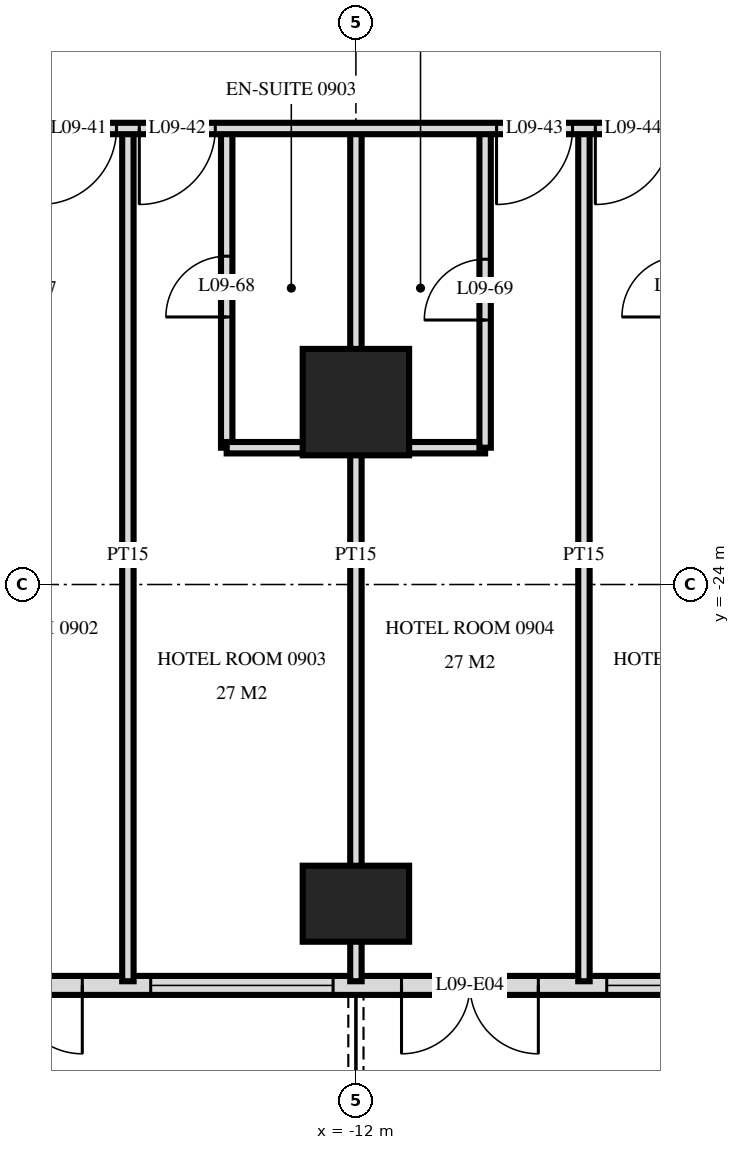
"""IFC4 building model, lengths in metres.
Left out: names, types, materials, properties, quantities, classifications, styles, units other than length and angle.
Written with IfcOpenShell. Run it as: python <this file> out.ifc"""

import sys

from ifc_helpers import new_model, si_unit, direction, frame, frame_2d, origin, origin_2d, place, context, subcontext, project, spatial, rectangle, extrude, element, fill, save


model = new_model("IFC4")
c1 = context("Model", 3, precision=1e-05, world=origin(), true_north=direction((0.0, 1.0)))
c2 = subcontext(c1, "Body", "Model", "MODEL_VIEW")
j1 = project(units=[si_unit("LENGTHUNIT", "METRE"), si_unit("PLANEANGLEUNIT", "RADIAN")], contexts=[c1])
p1 = place(None, origin())
s1 = spatial("IfcSite", under=j1, at=p1, CompositionType="ELEMENT")
p2 = place(p1, origin())
s2 = spatial("IfcBuilding", under=s1, at=p2, CompositionType="ELEMENT")
p3 = place(p2, frame((0.0, 0.0, 42.0)))
s3 = spatial("IfcBuildingStorey", under=s2, at=p3, CompositionType="ELEMENT", Elevation=42.0)
p4 = place(p3, frame((-12.0, -28.2, 0.0), z_axis=(0.0, 0.0, 1.0), x_axis=(1.0, 0.0, 0.0)))
e1 = element("IfcColumn", 1, at=p4, inside=s3, PredefinedType="COLUMN", context=c2, shape_type="SweptSolid", body=[
    extrude(rectangle(XDim=1.4, YDim=1.0, at=origin_2d()), origin(), (0.0, 0.0, 1.0), 3.6),
])
p5 = place(p3, frame((-12.0, -21.6, 0.0), z_axis=(0.0, 0.0, 1.0), x_axis=(1.0, 0.0, 0.0)))
e2 = element("IfcColumn", 2, at=p5, inside=s3, PredefinedType="COLUMN", context=c2, shape_type="SweptSolid", body=[
    extrude(rectangle(XDim=1.4, YDim=1.4, at=origin_2d()), origin(), (0.0, 0.0, 1.0), 3.6),
])
p6 = place(p3, frame((-28.775, -29.275, 0.0), z_axis=(0.0, 0.0, 1.0), x_axis=(1.0, 0.0, 0.0)))
e3 = element("IfcWall", 3, at=p6, inside=s3, PredefinedType="SOLIDWALL", context=c2, shape_type="SweptSolid", body=[
    extrude(rectangle(XDim=57.551, YDim=0.25, at=frame_2d((28.775, 0.0))), origin(), (0.0, 0.0, 1.0), 3.32),
])
p7 = place(p6, frame((0.575, 0.0, 0.0)))
e4 = element("IfcOpeningElement", 4, at=p7, cuts=e3, PredefinedType="OPENING", context=c2, shape_type="SweptSolid", body=[
    extrude(rectangle(XDim=1.8, YDim=2.4, at=frame_2d((0.9, 1.2))), frame((0.0, 0.135, 0.0), z_axis=(0.0, -1.0, 0.0), x_axis=(1.0, 0.0, 0.0)), (0.0, 0.0, 1.0), 0.27),
])
p8 = place(p6, frame((5.375, 0.0, 0.0)))
e5 = element("IfcOpeningElement", 5, at=p8, cuts=e3, PredefinedType="OPENING", context=c2, shape_type="SweptSolid", body=[
    extrude(rectangle(XDim=1.8, YDim=2.4, at=frame_2d((0.9, 1.2))), frame((0.0, 0.135, 0.0), z_axis=(0.0, -1.0, 0.0), x_axis=(1.0, 0.0, 0.0)), (0.0, 0.0, 1.0), 0.27),
])
p9 = place(p6, frame((8.075, 0.0, 0.3)))
e6 = element("IfcOpeningElement", 6, at=p9, cuts=e3, PredefinedType="OPENING", context=c2, shape_type="SweptSolid", body=[
    extrude(rectangle(XDim=2.4, YDim=2.1, at=frame_2d((1.2, 1.05))), frame((0.0, 0.135, 0.0), z_axis=(0.0, -1.0, 0.0), x_axis=(1.0, 0.0, 0.0)), (0.0, 0.0, 1.0), 0.27),
])
p10 = place(p6, frame((11.375, 0.0, 0.0)))
e7 = element("IfcOpeningElement", 7, at=p10, cuts=e3, PredefinedType="OPENING", context=c2, shape_type="SweptSolid", body=[
    extrude(rectangle(XDim=1.8, YDim=2.4, at=frame_2d((0.9, 1.2))), frame((0.0, 0.135, 0.0), z_axis=(0.0, -1.0, 0.0), x_axis=(1.0, 0.0, 0.0)), (0.0, 0.0, 1.0), 0.27),
])
p11 = place(p6, frame((14.075, 0.0, 0.3)))
e8 = element("IfcOpeningElement", 8, at=p11, cuts=e3, PredefinedType="OPENING", context=c2, shape_type="SweptSolid", body=[
    extrude(rectangle(XDim=2.4, YDim=2.1, at=frame_2d((1.2, 1.05))), frame((0.0, 0.135, 0.0), z_axis=(0.0, -1.0, 0.0), x_axis=(1.0, 0.0, 0.0)), (0.0, 0.0, 1.0), 0.27),
])
p12 = place(p6, frame((17.375, 0.0, 0.0)))
e9 = element("IfcOpeningElement", 9, at=p12, cuts=e3, PredefinedType="OPENING", context=c2, shape_type="SweptSolid", body=[
    extrude(rectangle(XDim=1.8, YDim=2.4, at=frame_2d((0.9, 1.2))), frame((0.0, 0.135, 0.0), z_axis=(0.0, -1.0, 0.0), x_axis=(1.0, 0.0, 0.0)), (0.0, 0.0, 1.0), 0.27),
])
p13 = place(p6, frame((20.075, 0.0, 0.3)))
e10 = element("IfcOpeningElement", 10, at=p13, cuts=e3, PredefinedType="OPENING", context=c2, shape_type="SweptSolid", body=[
    extrude(rectangle(XDim=2.4, YDim=2.1, at=frame_2d((1.2, 1.05))), frame((0.0, 0.135, 0.0), z_axis=(0.0, -1.0, 0.0), x_axis=(1.0, 0.0, 0.0)), (0.0, 0.0, 1.0), 0.27),
])
p14 = place(p6, frame((23.075, 0.0, 0.3)))
e11 = element("IfcOpeningElement", 11, at=p14, cuts=e3, PredefinedType="OPENING", context=c2, shape_type="SweptSolid", body=[
    extrude(rectangle(XDim=2.4, YDim=2.1, at=frame_2d((1.2, 1.05))), frame((0.0, 0.135, 0.0), z_axis=(0.0, -1.0, 0.0), x_axis=(1.0, 0.0, 0.0)), (0.0, 0.0, 1.0), 0.27),
])
p15 = place(p6, frame((26.375, 0.0, 0.0)))
e12 = element("IfcOpeningElement", 12, at=p15, cuts=e3, PredefinedType="OPENING", context=c2, shape_type="SweptSolid", body=[
    extrude(rectangle(XDim=1.8, YDim=2.4, at=frame_2d((0.9, 1.2))), frame((0.0, 0.135, 0.0), z_axis=(0.0, -1.0, 0.0), x_axis=(1.0, 0.0, 0.0)), (0.0, 0.0, 1.0), 0.27),
])
p16 = place(p6, frame((29.375, 0.0, 0.0)))
e13 = element("IfcOpeningElement", 13, at=p16, cuts=e3, PredefinedType="OPENING", context=c2, shape_type="SweptSolid", body=[
    extrude(rectangle(XDim=1.8, YDim=2.4, at=frame_2d((0.9, 1.2))), frame((0.0, 0.135, 0.0), z_axis=(0.0, -1.0, 0.0), x_axis=(1.0, 0.0, 0.0)), (0.0, 0.0, 1.0), 0.27),
])
p17 = place(p6, frame((32.075, 0.0, 0.3)))
e14 = element("IfcOpeningElement", 14, at=p17, cuts=e3, PredefinedType="OPENING", context=c2, shape_type="SweptSolid", body=[
    extrude(rectangle(XDim=2.4, YDim=2.1, at=frame_2d((1.2, 1.05))), frame((0.0, 0.135, 0.0), z_axis=(0.0, -1.0, 0.0), x_axis=(1.0, 0.0, 0.0)), (0.0, 0.0, 1.0), 0.27),
])
p18 = place(p6, frame((35.375, 0.0, 0.0)))
e15 = element("IfcOpeningElement", 15, at=p18, cuts=e3, PredefinedType="OPENING", context=c2, shape_type="SweptSolid", body=[
    extrude(rectangle(XDim=1.8, YDim=2.4, at=frame_2d((0.9, 1.2))), frame((0.0, 0.135, 0.0), z_axis=(0.0, -1.0, 0.0), x_axis=(1.0, 0.0, 0.0)), (0.0, 0.0, 1.0), 0.27),
])
p19 = place(p6, frame((38.075, 0.0, 0.3)))
e16 = element("IfcOpeningElement", 16, at=p19, cuts=e3, PredefinedType="OPENING", context=c2, shape_type="SweptSolid", body=[
    extrude(rectangle(XDim=2.4, YDim=2.1, at=frame_2d((1.2, 1.05))), frame((0.0, 0.135, 0.0), z_axis=(0.0, -1.0, 0.0), x_axis=(1.0, 0.0, 0.0)), (0.0, 0.0, 1.0), 0.27),
])
p20 = place(p6, frame((41.375, 0.0, 0.0)))
e17 = element("IfcOpeningElement", 17, at=p20, cuts=e3, PredefinedType="OPENING", context=c2, shape_type="SweptSolid", body=[
    extrude(rectangle(XDim=1.8, YDim=2.4, at=frame_2d((0.9, 1.2))), frame((0.0, 0.135, 0.0), z_axis=(0.0, -1.0, 0.0), x_axis=(1.0, 0.0, 0.0)), (0.0, 0.0, 1.0), 0.27),
])
p21 = place(p6, frame((44.075, 0.0, 0.3)))
e18 = element("IfcOpeningElement", 18, at=p21, cuts=e3, PredefinedType="OPENING", context=c2, shape_type="SweptSolid", body=[
    extrude(rectangle(XDim=2.4, YDim=2.1, at=frame_2d((1.2, 1.05))), frame((0.0, 0.135, 0.0), z_axis=(0.0, -1.0, 0.0), x_axis=(1.0, 0.0, 0.0)), (0.0, 0.0, 1.0), 0.27),
])
p22 = place(p6, frame((47.375, 0.0, 0.0)))
e19 = element("IfcOpeningElement", 19, at=p22, cuts=e3, PredefinedType="OPENING", context=c2, shape_type="SweptSolid", body=[
    extrude(rectangle(XDim=1.8, YDim=2.4, at=frame_2d((0.9, 1.2))), frame((0.0, 0.135, 0.0), z_axis=(0.0, -1.0, 0.0), x_axis=(1.0, 0.0, 0.0)), (0.0, 0.0, 1.0), 0.27),
])
p23 = place(p6, frame((50.075, 0.0, 0.3)))
e20 = element("IfcOpeningElement", 20, at=p23, cuts=e3, PredefinedType="OPENING", context=c2, shape_type="SweptSolid", body=[
    extrude(rectangle(XDim=2.4, YDim=2.1, at=frame_2d((1.2, 1.05))), frame((0.0, 0.135, 0.0), z_axis=(0.0, -1.0, 0.0), x_axis=(1.0, 0.0, 0.0)), (0.0, 0.0, 1.0), 0.27),
])
p24 = place(p6, frame((53.375, 0.0, 0.0)))
e21 = element("IfcOpeningElement", 21, at=p24, cuts=e3, PredefinedType="OPENING", context=c2, shape_type="SweptSolid", body=[
    extrude(rectangle(XDim=1.8, YDim=2.4, at=frame_2d((0.9, 1.2))), frame((0.0, 0.135, 0.0), z_axis=(0.0, -1.0, 0.0), x_axis=(1.0, 0.0, 0.0)), (0.0, 0.0, 1.0), 0.27),
])
p25 = place(p3, frame((-9.0, -29.22, 0.0), z_axis=(0.0, 0.0, 1.0), x_axis=(0.0, 1.0, 0.0)))
e22 = element("IfcWall", 22, at=p25, inside=s3, PredefinedType="PARTITIONING", context=c2, shape_type="SweptSolid", body=[
    extrude(rectangle(XDim=11.22, YDim=0.15, at=frame_2d((5.61, 0.0))), origin(), (0.0, 0.0, 1.0), 3.32),
])
p26 = place(p3, frame((-10.3, -22.2, 0.0), z_axis=(0.0, 0.0, 1.0), x_axis=(0.0, 1.0, 0.0)))
e23 = element("IfcWall", 23, at=p26, inside=s3, PredefinedType="PARTITIONING", context=c2, shape_type="SweptSolid", body=[
    extrude(rectangle(XDim=4.2, YDim=0.15, at=frame_2d((2.1, 0.0))), origin(), (0.0, 0.0, 1.0), 3.32),
])
p27 = place(p26, frame((1.68, 0.0, 0.0)))
e24 = element("IfcOpeningElement", 24, at=p27, cuts=e23, PredefinedType="OPENING", context=c2, shape_type="SweptSolid", body=[
    extrude(rectangle(XDim=0.8, YDim=2.1, at=frame_2d((0.4, 1.05))), frame((0.0, 0.085, 0.0), z_axis=(0.0, -1.0, 0.0), x_axis=(1.0, 0.0, 0.0)), (0.0, 0.0, 1.0), 0.17),
])
p28 = place(p3, frame((-12.0, -29.22, 0.0), z_axis=(0.0, 0.0, 1.0), x_axis=(0.0, 1.0, 0.0)))
e25 = element("IfcWall", 25, at=p28, inside=s3, PredefinedType="PARTITIONING", context=c2, shape_type="SweptSolid", body=[
    extrude(rectangle(XDim=11.22, YDim=0.15, at=frame_2d((5.61, 0.0))), origin(), (0.0, 0.0, 1.0), 3.32),
])
p29 = place(p3, frame((-13.7, -22.2, 0.0), z_axis=(0.0, 0.0, 1.0), x_axis=(0.0, 1.0, 0.0)))
e26 = element("IfcWall", 26, at=p29, inside=s3, PredefinedType="PARTITIONING", context=c2, shape_type="SweptSolid", body=[
    extrude(rectangle(XDim=4.2, YDim=0.15, at=frame_2d((2.1, 0.0))), origin(), (0.0, 0.0, 1.0), 3.32),
])
p30 = place(p29, frame((1.72, 0.0, 0.0)))
e27 = element("IfcOpeningElement", 27, at=p30, cuts=e26, PredefinedType="OPENING", context=c2, shape_type="SweptSolid", body=[
    extrude(rectangle(XDim=0.8, YDim=2.1, at=frame_2d((0.4, 1.05))), frame((0.0, 0.085, 0.0), z_axis=(0.0, -1.0, 0.0), x_axis=(1.0, 0.0, 0.0)), (0.0, 0.0, 1.0), 0.17),
])
p31 = place(p3, frame((-15.0, -29.22, 0.0), z_axis=(0.0, 0.0, 1.0), x_axis=(0.0, 1.0, 0.0)))
e28 = element("IfcWall", 28, at=p31, inside=s3, PredefinedType="PARTITIONING", context=c2, shape_type="SweptSolid", body=[
    extrude(rectangle(XDim=11.22, YDim=0.15, at=frame_2d((5.61, 0.0))), origin(), (0.0, 0.0, 1.0), 3.32),
])
p32 = place(p3, frame((-13.7, -22.2, 0.0), z_axis=(0.0, 0.0, 1.0), x_axis=(1.0, 0.0, 0.0)))
e29 = element("IfcWall", 29, at=p32, inside=s3, PredefinedType="PARTITIONING", context=c2, shape_type="SweptSolid", body=[
    extrude(rectangle(XDim=3.4, YDim=0.15, at=frame_2d((1.7, 0.0))), origin(), (0.0, 0.0, 1.0), 3.32),
])
p33 = place(p3, frame((-33.12, -18.0, 0.0), z_axis=(0.0, 0.0, 1.0), x_axis=(1.0, 0.0, 0.0)))
e30 = element("IfcWall", 30, at=p33, inside=s3, PredefinedType="PARTITIONING", context=c2, shape_type="SweptSolid", body=[
    extrude(rectangle(XDim=66.24, YDim=0.15, at=frame_2d((33.12, 0.0))), origin(), (0.0, 0.0, 1.0), 3.32),
])
p34 = place(p33, frame((12.27, 0.0, 0.0)))
e31 = element("IfcOpeningElement", 31, at=p34, cuts=e30, PredefinedType="OPENING", context=c2, shape_type="SweptSolid", body=[
    extrude(rectangle(XDim=1.0, YDim=2.1, at=frame_2d((0.5, 1.05))), frame((0.0, 0.085, 0.0), z_axis=(0.0, -1.0, 0.0), x_axis=(1.0, 0.0, 0.0)), (0.0, 0.0, 1.0), 0.17),
])
p35 = place(p33, frame((16.97, 0.0, 0.0)))
e32 = element("IfcOpeningElement", 32, at=p35, cuts=e30, PredefinedType="OPENING", context=c2, shape_type="SweptSolid", body=[
    extrude(rectangle(XDim=1.0, YDim=2.1, at=frame_2d((0.5, 1.05))), frame((0.0, 0.085, 0.0), z_axis=(0.0, -1.0, 0.0), x_axis=(1.0, 0.0, 0.0)), (0.0, 0.0, 1.0), 0.17),
])
p36 = place(p33, frame((18.27, 0.0, 0.0)))
e33 = element("IfcOpeningElement", 33, at=p36, cuts=e30, PredefinedType="OPENING", context=c2, shape_type="SweptSolid", body=[
    extrude(rectangle(XDim=1.0, YDim=2.1, at=frame_2d((0.5, 1.05))), frame((0.0, 0.085, 0.0), z_axis=(0.0, -1.0, 0.0), x_axis=(1.0, 0.0, 0.0)), (0.0, 0.0, 1.0), 0.17),
])
p37 = place(p33, frame((22.97, 0.0, 0.0)))
e34 = element("IfcOpeningElement", 34, at=p37, cuts=e30, PredefinedType="OPENING", context=c2, shape_type="SweptSolid", body=[
    extrude(rectangle(XDim=1.0, YDim=2.1, at=frame_2d((0.5, 1.05))), frame((0.0, 0.085, 0.0), z_axis=(0.0, -1.0, 0.0), x_axis=(1.0, 0.0, 0.0)), (0.0, 0.0, 1.0), 0.17),
])
p38 = place(p33, frame((24.27, 0.0, 0.0)))
e35 = element("IfcOpeningElement", 35, at=p38, cuts=e30, PredefinedType="OPENING", context=c2, shape_type="SweptSolid", body=[
    extrude(rectangle(XDim=1.0, YDim=2.1, at=frame_2d((0.5, 1.05))), frame((0.0, 0.085, 0.0), z_axis=(0.0, -1.0, 0.0), x_axis=(1.0, 0.0, 0.0)), (0.0, 0.0, 1.0), 0.17),
])
p39 = place(p33, frame((28.97, 0.0, 0.0)))
e36 = element("IfcOpeningElement", 36, at=p39, cuts=e30, PredefinedType="OPENING", context=c2, shape_type="SweptSolid", body=[
    extrude(rectangle(XDim=1.0, YDim=2.1, at=frame_2d((0.5, 1.05))), frame((0.0, 0.085, 0.0), z_axis=(0.0, -1.0, 0.0), x_axis=(1.0, 0.0, 0.0)), (0.0, 0.0, 1.0), 0.17),
])
p40 = place(p33, frame((30.27, 0.0, 0.0)))
e37 = element("IfcOpeningElement", 37, at=p40, cuts=e30, PredefinedType="OPENING", context=c2, shape_type="SweptSolid", body=[
    extrude(rectangle(XDim=1.0, YDim=2.1, at=frame_2d((0.5, 1.05))), frame((0.0, 0.085, 0.0), z_axis=(0.0, -1.0, 0.0), x_axis=(1.0, 0.0, 0.0)), (0.0, 0.0, 1.0), 0.17),
])
p41 = place(p33, frame((34.97, 0.0, 0.0)))
e38 = element("IfcOpeningElement", 38, at=p41, cuts=e30, PredefinedType="OPENING", context=c2, shape_type="SweptSolid", body=[
    extrude(rectangle(XDim=1.0, YDim=2.1, at=frame_2d((0.5, 1.05))), frame((0.0, 0.085, 0.0), z_axis=(0.0, -1.0, 0.0), x_axis=(1.0, 0.0, 0.0)), (0.0, 0.0, 1.0), 0.17),
])
p42 = place(p33, frame((37.27, 0.0, 0.0)))
e39 = element("IfcOpeningElement", 39, at=p42, cuts=e30, PredefinedType="OPENING", context=c2, shape_type="SweptSolid", body=[
    extrude(rectangle(XDim=1.0, YDim=2.1, at=frame_2d((0.5, 1.05))), frame((0.0, 0.085, 0.0), z_axis=(0.0, -1.0, 0.0), x_axis=(1.0, 0.0, 0.0)), (0.0, 0.0, 1.0), 0.17),
])
p43 = place(p33, frame((43.97, 0.0, 0.0)))
e40 = element("IfcOpeningElement", 40, at=p43, cuts=e30, PredefinedType="OPENING", context=c2, shape_type="SweptSolid", body=[
    extrude(rectangle(XDim=1.0, YDim=2.1, at=frame_2d((0.5, 1.05))), frame((0.0, 0.085, 0.0), z_axis=(0.0, -1.0, 0.0), x_axis=(1.0, 0.0, 0.0)), (0.0, 0.0, 1.0), 0.17),
])
p44 = place(p33, frame((45.27, 0.0, 0.0)))
e41 = element("IfcOpeningElement", 41, at=p44, cuts=e30, PredefinedType="OPENING", context=c2, shape_type="SweptSolid", body=[
    extrude(rectangle(XDim=1.0, YDim=2.1, at=frame_2d((0.5, 1.05))), frame((0.0, 0.085, 0.0), z_axis=(0.0, -1.0, 0.0), x_axis=(1.0, 0.0, 0.0)), (0.0, 0.0, 1.0), 0.17),
])
p45 = place(p33, frame((51.22, 0.0, 0.0)))
e42 = element("IfcOpeningElement", 42, at=p45, cuts=e30, PredefinedType="OPENING", context=c2, shape_type="SweptSolid", body=[
    extrude(rectangle(XDim=1.0, YDim=2.1, at=frame_2d((0.5, 1.05))), frame((0.0, 0.085, 0.0), z_axis=(0.0, -1.0, 0.0), x_axis=(1.0, 0.0, 0.0)), (0.0, 0.0, 1.0), 0.17),
])
p46 = place(p33, frame((54.27, 0.0, 0.0)))
e43 = element("IfcOpeningElement", 43, at=p46, cuts=e30, PredefinedType="OPENING", context=c2, shape_type="SweptSolid", body=[
    extrude(rectangle(XDim=1.0, YDim=2.1, at=frame_2d((0.5, 1.05))), frame((0.0, 0.085, 0.0), z_axis=(0.0, -1.0, 0.0), x_axis=(1.0, 0.0, 0.0)), (0.0, 0.0, 1.0), 0.17),
])
p47 = place(p33, frame((6.07, 0.0, 0.0)))
e44 = element("IfcOpeningElement", 44, at=p47, cuts=e30, PredefinedType="OPENING", context=c2, shape_type="SweptSolid", body=[
    extrude(rectangle(XDim=1.0, YDim=2.1, at=frame_2d((0.5, 1.05))), frame((0.0, 0.085, 0.0), z_axis=(0.0, -1.0, 0.0), x_axis=(1.0, 0.0, 0.0)), (0.0, 0.0, 1.0), 0.17),
])
p48 = place(p33, frame((63.37, 0.0, 0.0)))
e45 = element("IfcOpeningElement", 45, at=p48, cuts=e30, PredefinedType="OPENING", context=c2, shape_type="SweptSolid", body=[
    extrude(rectangle(XDim=1.0, YDim=2.1, at=frame_2d((0.5, 1.05))), frame((0.0, 0.085, 0.0), z_axis=(0.0, -1.0, 0.0), x_axis=(1.0, 0.0, 0.0)), (0.0, 0.0, 1.0), 0.17),
])
p49 = place(p10, frame((0.9, 0.0, 0.0), z_axis=(0.0, 0.0, 1.0), x_axis=(-1.0, 0.0, 0.0)))
e46 = element("IfcDoor", 46, at=p49, inside=s3, OperationType="DOUBLE_DOOR_SINGLE_SWING", PredefinedType="DOOR", context=c2, shape_type="SweptSolid", body=[
    extrude(rectangle(XDim=1.8, YDim=2.4, at=frame_2d((0.0, 1.2))), frame((0.0, -0.025, 0.0), z_axis=(0.0, 1.0, 0.0), x_axis=(-1.0, 0.0, 0.0)), (0.0, 0.0, 1.0), 0.05),
])
fill(e7, e46)
p50 = place(p11, origin())
e47 = element("IfcWindow", 47, at=p50, inside=s3, PartitioningType="SINGLE_PANEL", PredefinedType="WINDOW", context=c2, shape_type="SweptSolid", body=[
    extrude(rectangle(XDim=2.4, YDim=2.1, at=frame_2d((1.2, 1.05))), frame((0.0, 0.03, 0.0), z_axis=(0.0, -1.0, 0.0), x_axis=(1.0, 0.0, 0.0)), (0.0, 0.0, 1.0), 0.06),
])
fill(e8, e47)
p51 = place(p12, frame((0.9, 0.0, 0.0), z_axis=(0.0, 0.0, 1.0), x_axis=(-1.0, 0.0, 0.0)))
e48 = element("IfcDoor", 48, at=p51, inside=s3, OperationType="DOUBLE_DOOR_SINGLE_SWING", PredefinedType="DOOR", context=c2, shape_type="SweptSolid", body=[
    extrude(rectangle(XDim=1.8, YDim=2.4, at=frame_2d((0.0, 1.2))), frame((0.0, -0.025, 0.0), z_axis=(0.0, 1.0, 0.0), x_axis=(-1.0, 0.0, 0.0)), (0.0, 0.0, 1.0), 0.05),
])
fill(e9, e48)
p52 = place(p13, origin())
e49 = element("IfcWindow", 49, at=p52, inside=s3, PartitioningType="SINGLE_PANEL", PredefinedType="WINDOW", context=c2, shape_type="SweptSolid", body=[
    extrude(rectangle(XDim=2.4, YDim=2.1, at=frame_2d((1.2, 1.05))), frame((0.0, 0.03, 0.0), z_axis=(0.0, -1.0, 0.0), x_axis=(1.0, 0.0, 0.0)), (0.0, 0.0, 1.0), 0.06),
])
fill(e10, e49)
p53 = place(p35, frame((0.5, 0.0, 0.0), z_axis=(0.0, 0.0, 1.0), x_axis=(-1.0, 0.0, 0.0)))
e50 = element("IfcDoor", 50, at=p53, inside=s3, OperationType="SINGLE_SWING_LEFT", PredefinedType="DOOR", context=c2, shape_type="SweptSolid", body=[
    extrude(rectangle(XDim=1.0, YDim=2.1, at=frame_2d((0.0, 1.05))), frame((0.0, -0.025, 0.0), z_axis=(0.0, 1.0, 0.0), x_axis=(-1.0, 0.0, 0.0)), (0.0, 0.0, 1.0), 0.05),
])
fill(e32, e50)
p54 = place(p36, frame((0.5, 0.0, 0.0), z_axis=(0.0, 0.0, 1.0), x_axis=(-1.0, 0.0, 0.0)))
e51 = element("IfcDoor", 51, at=p54, inside=s3, OperationType="SINGLE_SWING_LEFT", PredefinedType="DOOR", context=c2, shape_type="SweptSolid", body=[
    extrude(rectangle(XDim=1.0, YDim=2.1, at=frame_2d((0.0, 1.05))), frame((0.0, -0.025, 0.0), z_axis=(0.0, 1.0, 0.0), x_axis=(-1.0, 0.0, 0.0)), (0.0, 0.0, 1.0), 0.05),
])
fill(e33, e51)
p55 = place(p37, frame((0.5, 0.0, 0.0), z_axis=(0.0, 0.0, 1.0), x_axis=(-1.0, 0.0, 0.0)))
e52 = element("IfcDoor", 52, at=p55, inside=s3, OperationType="SINGLE_SWING_LEFT", PredefinedType="DOOR", context=c2, shape_type="SweptSolid", body=[
    extrude(rectangle(XDim=1.0, YDim=2.1, at=frame_2d((0.0, 1.05))), frame((0.0, -0.025, 0.0), z_axis=(0.0, 1.0, 0.0), x_axis=(-1.0, 0.0, 0.0)), (0.0, 0.0, 1.0), 0.05),
])
fill(e34, e52)
p56 = place(p38, frame((0.5, 0.0, 0.0), z_axis=(0.0, 0.0, 1.0), x_axis=(-1.0, 0.0, 0.0)))
e53 = element("IfcDoor", 53, at=p56, inside=s3, OperationType="SINGLE_SWING_LEFT", PredefinedType="DOOR", context=c2, shape_type="SweptSolid", body=[
    extrude(rectangle(XDim=1.0, YDim=2.1, at=frame_2d((0.0, 1.05))), frame((0.0, -0.025, 0.0), z_axis=(0.0, 1.0, 0.0), x_axis=(-1.0, 0.0, 0.0)), (0.0, 0.0, 1.0), 0.05),
])
fill(e35, e53)
p57 = place(p30, origin())
e54 = element("IfcDoor", 54, at=p57, inside=s3, OperationType="SINGLE_SWING_RIGHT", PredefinedType="DOOR", context=c2, shape_type="SweptSolid", body=[
    extrude(rectangle(XDim=0.8, YDim=2.1, at=frame_2d((0.4, 1.05))), frame((0.0, 0.025, 0.0), z_axis=(0.0, -1.0, 0.0), x_axis=(1.0, 0.0, 0.0)), (0.0, 0.0, 1.0), 0.05),
])
fill(e27, e54)
p58 = place(p27, origin())
e55 = element("IfcDoor", 55, at=p58, inside=s3, OperationType="SINGLE_SWING_RIGHT", PredefinedType="DOOR", context=c2, shape_type="SweptSolid", body=[
    extrude(rectangle(XDim=0.8, YDim=2.1, at=frame_2d((0.4, 1.05))), frame((0.0, 0.025, 0.0), z_axis=(0.0, -1.0, 0.0), x_axis=(1.0, 0.0, 0.0)), (0.0, 0.0, 1.0), 0.05),
])
fill(e24, e55)
save(model, sys.argv[1])
